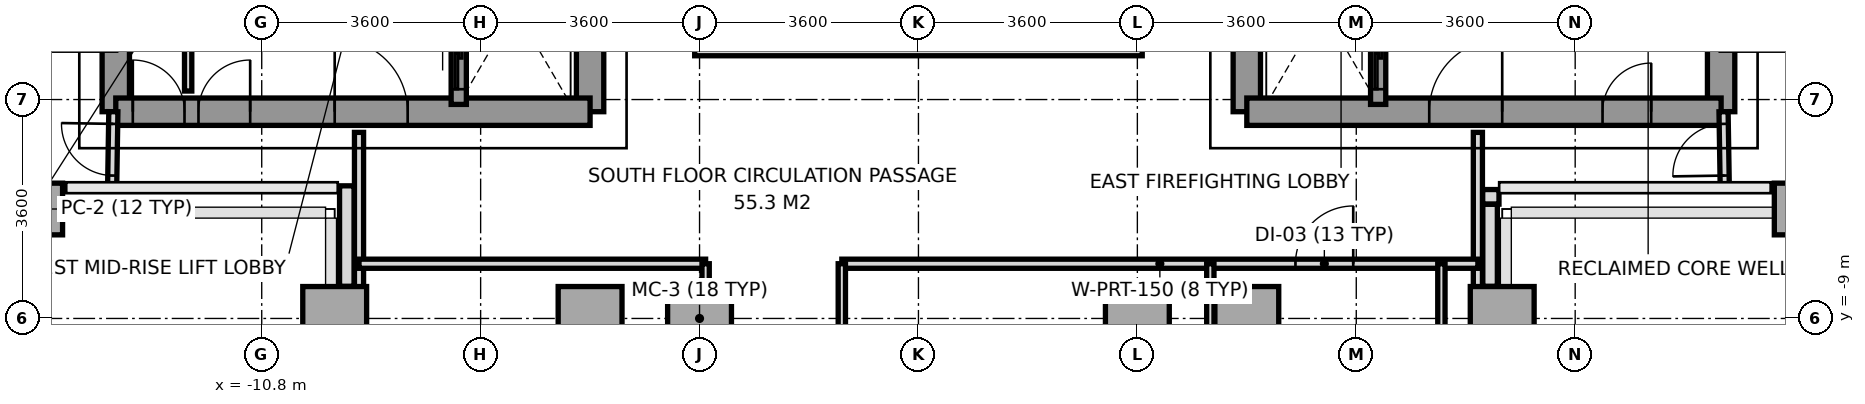
"""IFC4 building model, lengths in metres.
Left out: names, types, materials, properties, quantities, classifications, styles, units other than length and angle.
Written with IfcOpenShell. Run it as: python <this file> out.ifc"""

import sys

from ifc_helpers import new_model, si_unit, direction, frame, frame_2d, origin, origin_2d, place, context, subcontext, project, spatial, rectangle, extrude, source, transform, mapped, element, fill, save


model = new_model("IFC4")
c1 = context("Model", 3, precision=1e-05, world=origin(), true_north=direction((0.0, 1.0)))
c2 = subcontext(c1, "Body", "Model", "MODEL_VIEW")
j1 = project(units=[si_unit("LENGTHUNIT", "METRE"), si_unit("PLANEANGLEUNIT", "RADIAN")], contexts=[c1])
p1 = place(None, origin())
s1 = spatial("IfcSite", under=j1, at=p1, CompositionType="ELEMENT")
p2 = place(p1, origin())
s2 = spatial("IfcBuilding", under=s1, at=p2, CompositionType="ELEMENT")
p3 = place(p2, frame((0.0, 0.0, 124.4)))
s3 = spatial("IfcBuildingStorey", under=s2, at=p3, CompositionType="ELEMENT", Elevation=124.4)
m1 = source(origin(), c2, "Body", "SweptSolid", [
    extrude(rectangle(XDim=0.65, YDim=0.85, at=origin_2d()), origin(), (0.0, 0.0, 1.0), 3.2),
])
p4 = place(p3, frame((-14.4, -7.2, 0.0), z_axis=(0.0, 0.0, 1.0), x_axis=(1.0, 0.0, 0.0)))
e1 = element("IfcColumn", 1, at=p4, inside=s3, PredefinedType="COLUMN", context=c2, shape_type="MappedRepresentation", body=[
    mapped(m1, transform((0.0, 0.0, 0.0), x_axis=(1.0, 0.0, 0.0), y_axis=(0.0, 1.0, 0.0), z_axis=(0.0, 0.0, 1.0), scale=1.0)),
])
m2 = source(origin(), c2, "Body", "SweptSolid", [
    extrude(rectangle(XDim=1.05, YDim=1.05, at=origin_2d()), origin(), (0.0, 0.0, 1.0), 3.2),
])
for number, where, z_axis, x_axis in (
    (2, (-9.6, -9.0, 0.0), (0.0, 0.0, 1.0), (1.0, 0.0, 0.0)),
    (3, (-5.4, -9.0, 0.0), (0.0, 0.0, 1.0), (1.0, 0.0, 0.0)),
    (4, (-3.6, -9.0, 0.0), (0.0, 0.0, 1.0), (1.0, 0.0, 0.0)),
    (5, (3.6, -9.0, 0.0), (0.0, 0.0, 1.0), (1.0, 0.0, 0.0)),
    (6, (5.4, -9.0, 0.0), (0.0, 0.0, 1.0), (1.0, 0.0, 0.0)),
    (7, (9.6, -9.0, 0.0), (0.0, 0.0, 1.0), (1.0, 0.0, 0.0)),
):
    element("IfcColumn", number, at=place(p3, frame(where, z_axis=z_axis, x_axis=x_axis)), inside=s3, PredefinedType="COLUMN", context=c2, shape_type="MappedRepresentation", body=[
        mapped(m2, transform((0.0, 0.0, 0.0), x_axis=(1.0, 0.0, 0.0), y_axis=(0.0, 1.0, 0.0), z_axis=(0.0, 0.0, 1.0), scale=1.0)),
    ])
p5 = place(p3, frame((14.4, -7.2, 0.0), z_axis=(0.0, 0.0, 1.0), x_axis=(1.0, 0.0, 0.0)))
e8 = element("IfcColumn", 8, at=p5, inside=s3, PredefinedType="COLUMN", context=c2, shape_type="MappedRepresentation", body=[
    mapped(m1, transform((0.0, 0.0, 0.0), x_axis=(1.0, 0.0, 0.0), y_axis=(0.0, 1.0, 0.0), z_axis=(0.0, 0.0, 1.0), scale=1.0)),
])
p6 = place(p3, frame((9.547, -7.0, 0.0), z_axis=(0.0, 0.0, 1.0), x_axis=(-1.0, 0.0, 0.0)))
e9 = element("IfcWall", 9, at=p6, inside=s3, PredefinedType="PARAPET", context=c2, shape_type="SweptSolid", body=[
    extrude(rectangle(XDim=0.269, YDim=0.24, at=frame_2d((0.135, 0.0))), origin(), (0.0, 0.0, 1.0), 1.15),
])
p7 = place(p3, frame((9.4, -7.123, 0.0), z_axis=(0.0, 0.0, 1.0), x_axis=(0.0, -1.0, 0.0)))
e10 = element("IfcWall", 10, at=p7, inside=s3, PredefinedType="PARAPET", context=c2, shape_type="SweptSolid", body=[
    extrude(rectangle(XDim=1.349, YDim=0.24, at=frame_2d((0.674, 0.0))), origin(), (0.0, 0.0, 1.0), 1.15),
])
p8 = place(p3, frame((-9.4, -8.472, 0.0), z_axis=(0.0, 0.0, 1.0), x_axis=(0.0, 1.0, 0.0)))
e11 = element("IfcWall", 11, at=p8, inside=s3, PredefinedType="PARAPET", context=c2, shape_type="SweptSolid", body=[
    extrude(rectangle(XDim=1.653, YDim=0.24, at=frame_2d((0.827, 0.0))), origin(), (0.0, 0.0, 1.0), 1.15),
])
p9 = place(p3, frame((-13.2, -5.6, 0.0), z_axis=(0.0, 0.0, 1.0), x_axis=(0.0, 1.0, 0.0)))
e12 = element("IfcWall", 12, at=p9, inside=s3, PredefinedType="SHEAR", context=c2, shape_type="SweptSolid", body=[
    extrude(rectangle(XDim=11.2, YDim=0.45, at=frame_2d((5.6, 0.0))), origin(), (0.0, 0.0, 1.0), 3.2),
])
p10 = place(p3, frame((-5.4, -5.6, 0.0), z_axis=(0.0, 0.0, 1.0), x_axis=(0.0, 1.0, 0.0)))
e13 = element("IfcWall", 13, at=p10, inside=s3, PredefinedType="SHEAR", context=c2, shape_type="SweptSolid", body=[
    extrude(rectangle(XDim=12.5, YDim=0.45, at=frame_2d((6.25, 0.0))), origin(), (0.0, 0.0, 1.0), 3.2),
])
p11 = place(p10, frame((4.55, 0.0, 0.0)))
e14 = element("IfcOpeningElement", 14, at=p11, cuts=e13, PredefinedType="OPENING", context=c2, shape_type="SweptSolid", body=[
    extrude(rectangle(XDim=1.2, YDim=2.2, at=frame_2d((0.6, 1.1))), frame((0.0, 0.235, 0.0), z_axis=(0.0, -1.0, 0.0), x_axis=(1.0, 0.0, 0.0)), (0.0, 0.0, 1.0), 0.47),
])
p12 = place(p10, frame((6.86, 0.0, 0.0)))
e15 = element("IfcOpeningElement", 15, at=p12, cuts=e13, PredefinedType="OPENING", context=c2, shape_type="SweptSolid", body=[
    extrude(rectangle(XDim=0.8, YDim=2.1, at=frame_2d((0.4, 1.05))), frame((0.0, 0.235, 0.0), z_axis=(0.0, -1.0, 0.0), x_axis=(1.0, 0.0, 0.0)), (0.0, 0.0, 1.0), 0.47),
])
p13 = place(p3, frame((-13.2, -5.6, 0.0), z_axis=(0.0, 0.0, 1.0), x_axis=(1.0, 0.0, 0.0)))
e16 = element("IfcWall", 16, at=p13, inside=s3, PredefinedType="SHEAR", context=c2, shape_type="SweptSolid", body=[
    extrude(rectangle(XDim=7.8, YDim=0.45, at=frame_2d((3.9, 0.0))), origin(), (0.0, 0.0, 1.0), 3.2),
])
p14 = place(p13, frame((3.6, 0.0, 0.0)))
e17 = element("IfcOpeningElement", 17, at=p14, cuts=e16, PredefinedType="OPENING", context=c2, shape_type="SweptSolid", body=[
    extrude(rectangle(XDim=1.2, YDim=2.2, at=frame_2d((0.6, 1.1))), frame((0.0, 0.235, 0.0), z_axis=(0.0, -1.0, 0.0), x_axis=(1.0, 0.0, 0.0)), (0.0, 0.0, 1.0), 0.47),
])
p15 = place(p13, frame((0.28, 0.0, 0.0)))
e18 = element("IfcOpeningElement", 18, at=p15, cuts=e16, PredefinedType="OPENING", context=c2, shape_type="SweptSolid", body=[
    extrude(rectangle(XDim=0.85, YDim=2.1, at=frame_2d((0.425, 1.05))), frame((0.0, 0.235, 0.0), z_axis=(0.0, -1.0, 0.0), x_axis=(1.0, 0.0, 0.0)), (0.0, 0.0, 1.0), 0.47),
])
p16 = place(p13, frame((1.36, 0.0, 0.0)))
e19 = element("IfcOpeningElement", 19, at=p16, cuts=e16, PredefinedType="OPENING", context=c2, shape_type="SweptSolid", body=[
    extrude(rectangle(XDim=0.85, YDim=2.1, at=frame_2d((0.425, 1.05))), frame((0.0, 0.235, 0.0), z_axis=(0.0, -1.0, 0.0), x_axis=(1.0, 0.0, 0.0)), (0.0, 0.0, 1.0), 0.47),
])
p17 = place(p3, frame((13.2, -5.6, 0.0), z_axis=(0.0, 0.0, 1.0), x_axis=(0.0, 1.0, 0.0)))
e20 = element("IfcWall", 20, at=p17, inside=s3, PredefinedType="SHEAR", context=c2, shape_type="SweptSolid", body=[
    extrude(rectangle(XDim=11.2, YDim=0.45, at=frame_2d((5.6, 0.0))), origin(), (0.0, 0.0, 1.0), 3.2),
])
p18 = place(p3, frame((5.4, -5.6, 0.0), z_axis=(0.0, 0.0, 1.0), x_axis=(0.0, 1.0, 0.0)))
e21 = element("IfcWall", 21, at=p18, inside=s3, PredefinedType="SHEAR", context=c2, shape_type="SweptSolid", body=[
    extrude(rectangle(XDim=12.5, YDim=0.45, at=frame_2d((6.25, 0.0))), origin(), (0.0, 0.0, 1.0), 3.2),
])
p19 = place(p18, frame((4.55, 0.0, 0.0)))
e22 = element("IfcOpeningElement", 22, at=p19, cuts=e21, PredefinedType="OPENING", context=c2, shape_type="SweptSolid", body=[
    extrude(rectangle(XDim=1.2, YDim=2.2, at=frame_2d((0.6, 1.1))), frame((0.0, 0.235, 0.0), z_axis=(0.0, -1.0, 0.0), x_axis=(1.0, 0.0, 0.0)), (0.0, 0.0, 1.0), 0.47),
])
p20 = place(p18, frame((6.86, 0.0, 0.0)))
e23 = element("IfcOpeningElement", 23, at=p20, cuts=e21, PredefinedType="OPENING", context=c2, shape_type="SweptSolid", body=[
    extrude(rectangle(XDim=0.8, YDim=2.1, at=frame_2d((0.4, 1.05))), frame((0.0, 0.235, 0.0), z_axis=(0.0, -1.0, 0.0), x_axis=(1.0, 0.0, 0.0)), (0.0, 0.0, 1.0), 0.47),
])
p21 = place(p18, frame((7.88, 0.0, 0.0)))
e24 = element("IfcOpeningElement", 24, at=p21, cuts=e21, PredefinedType="OPENING", context=c2, shape_type="SweptSolid", body=[
    extrude(rectangle(XDim=0.8, YDim=2.1, at=frame_2d((0.4, 1.05))), frame((0.0, 0.235, 0.0), z_axis=(0.0, -1.0, 0.0), x_axis=(1.0, 0.0, 0.0)), (0.0, 0.0, 1.0), 0.47),
])
p22 = place(p3, frame((5.4, -5.6, 0.0), z_axis=(0.0, 0.0, 1.0), x_axis=(1.0, 0.0, 0.0)))
e25 = element("IfcWall", 25, at=p22, inside=s3, PredefinedType="SHEAR", context=c2, shape_type="SweptSolid", body=[
    extrude(rectangle(XDim=7.8, YDim=0.45, at=frame_2d((3.9, 0.0))), origin(), (0.0, 0.0, 1.0), 3.2),
])
p23 = place(p22, frame((3.0, 0.0, 0.0)))
e26 = element("IfcOpeningElement", 26, at=p23, cuts=e25, PredefinedType="OPENING", context=c2, shape_type="SweptSolid", body=[
    extrude(rectangle(XDim=1.2, YDim=2.2, at=frame_2d((0.6, 1.1))), frame((0.0, 0.235, 0.0), z_axis=(0.0, -1.0, 0.0), x_axis=(1.0, 0.0, 0.0)), (0.0, 0.0, 1.0), 0.47),
])
p24 = place(p22, frame((5.85, 0.0, 0.0)))
e27 = element("IfcOpeningElement", 27, at=p24, cuts=e25, PredefinedType="OPENING", context=c2, shape_type="SweptSolid", body=[
    extrude(rectangle(XDim=0.8, YDim=2.1, at=frame_2d((0.4, 1.05))), frame((0.0, 0.235, 0.0), z_axis=(0.0, -1.0, 0.0), x_axis=(1.0, 0.0, 0.0)), (0.0, 0.0, 1.0), 0.47),
])
p25 = place(p3, frame((-7.56, -5.48, 0.0), z_axis=(0.0, 0.0, 1.0), x_axis=(0.0, 1.0, 0.0)))
e28 = element("IfcWall", 28, at=p25, inside=s3, PredefinedType="SOLIDWALL", context=c2, shape_type="SweptSolid", body=[
    extrude(rectangle(XDim=1.6, YDim=0.25, at=frame_2d((0.8, 0.0))), origin(), (0.0, 0.0, 1.0), 3.2),
])
p26 = place(p25, frame((0.25, 0.0, 0.0)))
e29 = element("IfcOpeningElement", 29, at=p26, cuts=e28, PredefinedType="OPENING", context=c2, shape_type="SweptSolid", body=[
    extrude(rectangle(XDim=1.1, YDim=2.2, at=frame_2d((0.55, 1.1))), frame((0.0, 0.135, 0.0), z_axis=(0.0, -1.0, 0.0), x_axis=(1.0, 0.0, 0.0)), (0.0, 0.0, 1.0), 0.27),
])
p27 = place(p3, frame((7.56, -5.48, 0.0), z_axis=(0.0, 0.0, 1.0), x_axis=(0.0, 1.0, 0.0)))
e30 = element("IfcWall", 30, at=p27, inside=s3, PredefinedType="SOLIDWALL", context=c2, shape_type="SweptSolid", body=[
    extrude(rectangle(XDim=1.6, YDim=0.25, at=frame_2d((0.8, 0.0))), origin(), (0.0, 0.0, 1.0), 3.2),
])
p28 = place(p27, frame((0.25, 0.0, 0.0)))
e31 = element("IfcOpeningElement", 31, at=p28, cuts=e30, PredefinedType="OPENING", context=c2, shape_type="SweptSolid", body=[
    extrude(rectangle(XDim=1.1, YDim=2.2, at=frame_2d((0.55, 1.1))), frame((0.0, 0.135, 0.0), z_axis=(0.0, -1.0, 0.0), x_axis=(1.0, 0.0, 0.0)), (0.0, 0.0, 1.0), 0.27),
])
p29 = place(p3, frame((-12.01, -5.26, 0.0), z_axis=(0.0, 0.0, 1.0), x_axis=(0.0, 1.0, 0.0)))
e32 = element("IfcWall", 32, at=p29, inside=s3, PredefinedType="PARTITIONING", context=c2, shape_type="SweptSolid", body=[
    extrude(rectangle(XDim=2.94, YDim=0.12, at=frame_2d((1.47, 0.0))), origin(), (0.0, 0.0, 1.0), 3.2),
])
for number, where, z_axis, x_axis in (
    (33, (-9.2, -15.68, 0.0), (0.0, 0.0, 1.0), (0.0, 1.0, 0.0)),
    (34, (9.2, -15.68, 0.0), (0.0, 0.0, 1.0), (0.0, 1.0, 0.0)),
):
    element("IfcWall", number, at=place(p3, frame(where, z_axis=z_axis, x_axis=x_axis)), inside=s3, PredefinedType="PARTITIONING", context=c2, shape_type="SweptSolid", body=[
        extrude(rectangle(XDim=9.74, YDim=0.15, at=frame_2d((4.87, 0.0))), origin(), (0.0, 0.0, 1.0), 2.7),
    ])
p30 = place(p3, frame((-9.2, -8.1, 0.0), z_axis=(0.0, 0.0, 1.0), x_axis=(1.0, 0.0, 0.0)))
e35 = element("IfcWall", 35, at=p30, inside=s3, PredefinedType="PARTITIONING", context=c2, shape_type="SweptSolid", body=[
    extrude(rectangle(XDim=5.7, YDim=0.15, at=frame_2d((2.85, 0.0))), origin(), (0.0, 0.0, 1.0), 2.76),
])
p31 = place(p3, frame((-1.26, -8.1, 0.0), z_axis=(0.0, 0.0, 1.0), x_axis=(1.0, 0.0, 0.0)))
e36 = element("IfcWall", 36, at=p31, inside=s3, PredefinedType="PARTITIONING", context=c2, shape_type="SweptSolid", body=[
    extrude(rectangle(XDim=10.46, YDim=0.15, at=frame_2d((5.23, 0.0))), origin(), (0.0, 0.0, 1.0), 2.76),
])
p32 = place(p31, frame((7.46, 0.0, 0.0)))
e37 = element("IfcOpeningElement", 37, at=p32, cuts=e36, PredefinedType="OPENING", context=c2, shape_type="SweptSolid", body=[
    extrude(rectangle(XDim=0.95, YDim=2.15, at=frame_2d((0.475, 1.075))), frame((0.0, 0.085, 0.0), z_axis=(0.0, -1.0, 0.0), x_axis=(1.0, 0.0, 0.0)), (0.0, 0.0, 1.0), 0.17),
])
p33 = place(p3, frame((-3.5, -16.05, 0.0), z_axis=(0.0, 0.0, 1.0), x_axis=(0.0, 1.0, 0.0)))
e38 = element("IfcWall", 38, at=p33, inside=s3, PredefinedType="PARTITIONING", context=c2, shape_type="SweptSolid", body=[
    extrude(rectangle(XDim=7.95, YDim=0.12, at=frame_2d((3.975, 0.0))), origin(), (0.0, 0.0, 1.0), 2.7),
])
p34 = place(p33, frame((1.2, 0.0, 0.0)))
e39 = element("IfcOpeningElement", 39, at=p34, cuts=e38, PredefinedType="OPENING", context=c2, shape_type="SweptSolid", body=[
    extrude(rectangle(XDim=0.95, YDim=2.15, at=frame_2d((0.475, 1.075))), frame((0.0, 0.07, 0.0), z_axis=(0.0, -1.0, 0.0), x_axis=(1.0, 0.0, 0.0)), (0.0, 0.0, 1.0), 0.14),
])
p35 = place(p3, frame((-1.26, -16.05, 0.0), z_axis=(0.0, 0.0, 1.0), x_axis=(0.0, 1.0, 0.0)))
e40 = element("IfcWall", 40, at=p35, inside=s3, PredefinedType="PARTITIONING", context=c2, shape_type="SweptSolid", body=[
    extrude(rectangle(XDim=7.95, YDim=0.12, at=frame_2d((3.975, 0.0))), origin(), (0.0, 0.0, 1.0), 2.7),
])
p36 = place(p35, frame((1.95, 0.0, 0.0)))
e41 = element("IfcOpeningElement", 41, at=p36, cuts=e40, PredefinedType="OPENING", context=c2, shape_type="SweptSolid", body=[
    extrude(rectangle(XDim=0.95, YDim=2.15, at=frame_2d((0.475, 1.075))), frame((0.0, 0.07, 0.0), z_axis=(0.0, -1.0, 0.0), x_axis=(1.0, 0.0, 0.0)), (0.0, 0.0, 1.0), 0.14),
])
p37 = place(p3, frame((4.8, -11.5, 0.0), z_axis=(0.0, 0.0, 1.0), x_axis=(0.0, 1.0, 0.0)))
e42 = element("IfcWall", 42, at=p37, inside=s3, PredefinedType="PARTITIONING", context=c2, shape_type="SweptSolid", body=[
    extrude(rectangle(XDim=3.4, YDim=0.12, at=frame_2d((1.7, 0.0))), origin(), (0.0, 0.0, 1.0), 3.2),
])
p38 = place(p3, frame((8.6, -11.5, 0.0), z_axis=(0.0, 0.0, 1.0), x_axis=(0.0, 1.0, 0.0)))
e43 = element("IfcWall", 43, at=p38, inside=s3, PredefinedType="PARTITIONING", context=c2, shape_type="SweptSolid", body=[
    extrude(rectangle(XDim=3.4, YDim=0.12, at=frame_2d((1.7, 0.0))), origin(), (0.0, 0.0, 1.0), 2.7),
])
p39 = place(p3, frame((-13.26, -6.85, 0.0), z_axis=(0.0, 0.0, 1.0), x_axis=(0.016013571389, 0.999871774545, 0.0)))
e44 = element("IfcWall", 44, at=p39, inside=s3, PredefinedType="PARTITIONING", context=c2, shape_type="SweptSolid", body=[
    extrude(rectangle(XDim=1.25, YDim=0.15, at=frame_2d((0.625, 0.0))), origin(), (0.0, 0.0, 1.0), 3.2),
])
p40 = place(p39, frame((0.2, 0.0, 0.0)))
e45 = element("IfcOpeningElement", 45, at=p40, cuts=e44, PredefinedType="OPENING", context=c2, shape_type="SweptSolid", body=[
    extrude(rectangle(XDim=0.85, YDim=2.1, at=frame_2d((0.425, 1.05))), frame((0.0, 0.085, 0.0), z_axis=(0.0, -1.0, 0.0), x_axis=(1.0, 0.0, 0.0)), (0.0, 0.0, 1.0), 0.17),
])
p41 = place(p3, frame((13.26, -6.85, 0.0), z_axis=(0.0, 0.0, 1.0), x_axis=(-0.016013571389, 0.999871774545, 0.0)))
e46 = element("IfcWall", 46, at=p41, inside=s3, PredefinedType="PARTITIONING", context=c2, shape_type="SweptSolid", body=[
    extrude(rectangle(XDim=1.25, YDim=0.15, at=frame_2d((0.625, 0.0))), origin(), (0.0, 0.0, 1.0), 3.2),
])
p42 = place(p41, frame((0.2, 0.0, 0.0)))
e47 = element("IfcOpeningElement", 47, at=p42, cuts=e46, PredefinedType="OPENING", context=c2, shape_type="SweptSolid", body=[
    extrude(rectangle(XDim=0.85, YDim=2.1, at=frame_2d((0.425, 1.05))), frame((0.0, 0.085, 0.0), z_axis=(0.0, -1.0, 0.0), x_axis=(1.0, 0.0, 0.0)), (0.0, 0.0, 1.0), 0.17),
])
p43 = place(p3, frame((-3.68, -4.56, 0.0), z_axis=(0.0, 0.0, 1.0), x_axis=(1.0, 0.0, 0.0)))
e48 = element("IfcWall", 48, at=p43, inside=s3, PredefinedType="PARAPET", context=c2, shape_type="SweptSolid", body=[
    extrude(rectangle(XDim=7.36, YDim=0.24, at=frame_2d((3.68, 0.0))), origin(), (0.0, 0.0, 1.0), 1.15),
])
m3 = source(origin(), c2, "Body", "SweptSolid", [
    extrude(rectangle(XDim=1.2, YDim=2.2, at=frame_2d((0.6, 1.1))), frame((0.0, 0.025, 0.0), z_axis=(0.0, -1.0, 0.0), x_axis=(1.0, 0.0, 0.0)), (0.0, 0.0, 1.0), 0.05),
])
p44 = place(p14, origin())
e49 = element("IfcDoor", 49, at=p44, inside=s3, OperationType="SINGLE_SWING_LEFT", PredefinedType="DOOR", context=c2, shape_type="MappedRepresentation", body=[
    mapped(m3, transform((0.0, 0.0, 0.0), x_axis=(1.0, 0.0, 0.0), y_axis=(0.0, 1.0, 0.0), z_axis=(0.0, 0.0, 1.0), scale=1.0)),
])
fill(e17, e49)
p45 = place(p23, origin())
e50 = element("IfcDoor", 50, at=p45, inside=s3, OperationType="SINGLE_SWING_RIGHT", PredefinedType="DOOR", context=c2, shape_type="MappedRepresentation", body=[
    mapped(m3, transform((0.0, 0.0, 0.0), x_axis=(1.0, 0.0, 0.0), y_axis=(0.0, 1.0, 0.0), z_axis=(0.0, 0.0, 1.0), scale=1.0)),
])
fill(e26, e50)
m4 = source(origin(), c2, "Body", "SweptSolid", [
    extrude(rectangle(XDim=0.85, YDim=2.1, at=frame_2d((0.425, 1.05))), frame((0.0, 0.025, 0.0), z_axis=(0.0, -1.0, 0.0), x_axis=(1.0, 0.0, 0.0)), (0.0, 0.0, 1.0), 0.05),
])
p46 = place(p15, origin())
e51 = element("IfcDoor", 51, at=p46, inside=s3, OperationType="SINGLE_SWING_LEFT", PredefinedType="DOOR", context=c2, shape_type="MappedRepresentation", body=[
    mapped(m4, transform((0.0, 0.0, 0.0), x_axis=(1.0, 0.0, 0.0), y_axis=(0.0, 1.0, 0.0), z_axis=(0.0, 0.0, 1.0), scale=1.0)),
])
fill(e18, e51)
p47 = place(p16, origin())
e52 = element("IfcDoor", 52, at=p47, inside=s3, OperationType="SINGLE_SWING_RIGHT", PredefinedType="DOOR", context=c2, shape_type="MappedRepresentation", body=[
    mapped(m4, transform((0.0, 0.0, 0.0), x_axis=(1.0, 0.0, 0.0), y_axis=(0.0, 1.0, 0.0), z_axis=(0.0, 0.0, 1.0), scale=1.0)),
])
fill(e19, e52)
m5 = source(origin(), c2, "Body", "SweptSolid", [
    extrude(rectangle(XDim=0.8, YDim=2.1, at=frame_2d((0.4, 1.05))), frame((0.0, 0.025, 0.0), z_axis=(0.0, -1.0, 0.0), x_axis=(1.0, 0.0, 0.0)), (0.0, 0.0, 1.0), 0.05),
])
p48 = place(p24, origin())
e53 = element("IfcDoor", 53, at=p48, inside=s3, OperationType="SINGLE_SWING_RIGHT", PredefinedType="DOOR", context=c2, shape_type="MappedRepresentation", body=[
    mapped(m5, transform((0.0, 0.0, 0.0), x_axis=(1.0, 0.0, 0.0), y_axis=(0.0, 1.0, 0.0), z_axis=(0.0, 0.0, 1.0), scale=1.0)),
])
fill(e27, e53)
m6 = source(origin(), c2, "Body", "SweptSolid", [
    extrude(rectangle(XDim=1.1, YDim=2.2, at=frame_2d((0.55, 1.1))), frame((0.0, 0.025, 0.0), z_axis=(0.0, -1.0, 0.0), x_axis=(1.0, 0.0, 0.0)), (0.0, 0.0, 1.0), 0.05),
])
p49 = place(p26, origin())
e54 = element("IfcDoor", 54, at=p49, inside=s3, OperationType="SLIDING_TO_LEFT", PredefinedType="DOOR", context=c2, shape_type="MappedRepresentation", body=[
    mapped(m6, transform((0.0, 0.0, 0.0), x_axis=(1.0, 0.0, 0.0), y_axis=(0.0, 1.0, 0.0), z_axis=(0.0, 0.0, 1.0), scale=1.0)),
])
fill(e29, e54)
p50 = place(p28, origin())
e55 = element("IfcDoor", 55, at=p50, inside=s3, OperationType="SLIDING_TO_LEFT", PredefinedType="DOOR", context=c2, shape_type="MappedRepresentation", body=[
    mapped(m6, transform((0.0, 0.0, 0.0), x_axis=(1.0, 0.0, 0.0), y_axis=(0.0, 1.0, 0.0), z_axis=(0.0, 0.0, 1.0), scale=1.0)),
])
fill(e31, e55)
m7 = source(origin(), c2, "Body", "SweptSolid", [
    extrude(rectangle(XDim=0.95, YDim=2.15, at=frame_2d((0.475, 1.075))), frame((0.0, 0.025, 0.0), z_axis=(0.0, -1.0, 0.0), x_axis=(1.0, 0.0, 0.0)), (0.0, 0.0, 1.0), 0.05),
])
p51 = place(p32, origin())
e56 = element("IfcDoor", 56, at=p51, inside=s3, OperationType="SINGLE_SWING_RIGHT", PredefinedType="DOOR", context=c2, shape_type="MappedRepresentation", body=[
    mapped(m7, transform((0.0, 0.0, 0.0), x_axis=(1.0, 0.0, 0.0), y_axis=(0.0, 1.0, 0.0), z_axis=(0.0, 0.0, 1.0), scale=1.0)),
])
fill(e37, e56)
p52 = place(p40, origin())
e57 = element("IfcDoor", 57, at=p52, inside=s3, OperationType="SINGLE_SWING_RIGHT", PredefinedType="DOOR", context=c2, shape_type="MappedRepresentation", body=[
    mapped(m4, transform((0.0, 0.0, 0.0), x_axis=(1.0, 0.0, 0.0), y_axis=(0.0, 1.0, 0.0), z_axis=(0.0, 0.0, 1.0), scale=1.0)),
])
fill(e45, e57)
p53 = place(p42, origin())
e58 = element("IfcDoor", 58, at=p53, inside=s3, OperationType="SINGLE_SWING_LEFT", PredefinedType="DOOR", context=c2, shape_type="MappedRepresentation", body=[
    mapped(m4, transform((0.0, 0.0, 0.0), x_axis=(1.0, 0.0, 0.0), y_axis=(0.0, 1.0, 0.0), z_axis=(0.0, 0.0, 1.0), scale=1.0)),
])
fill(e47, e58)
save(model, sys.argv[1])
